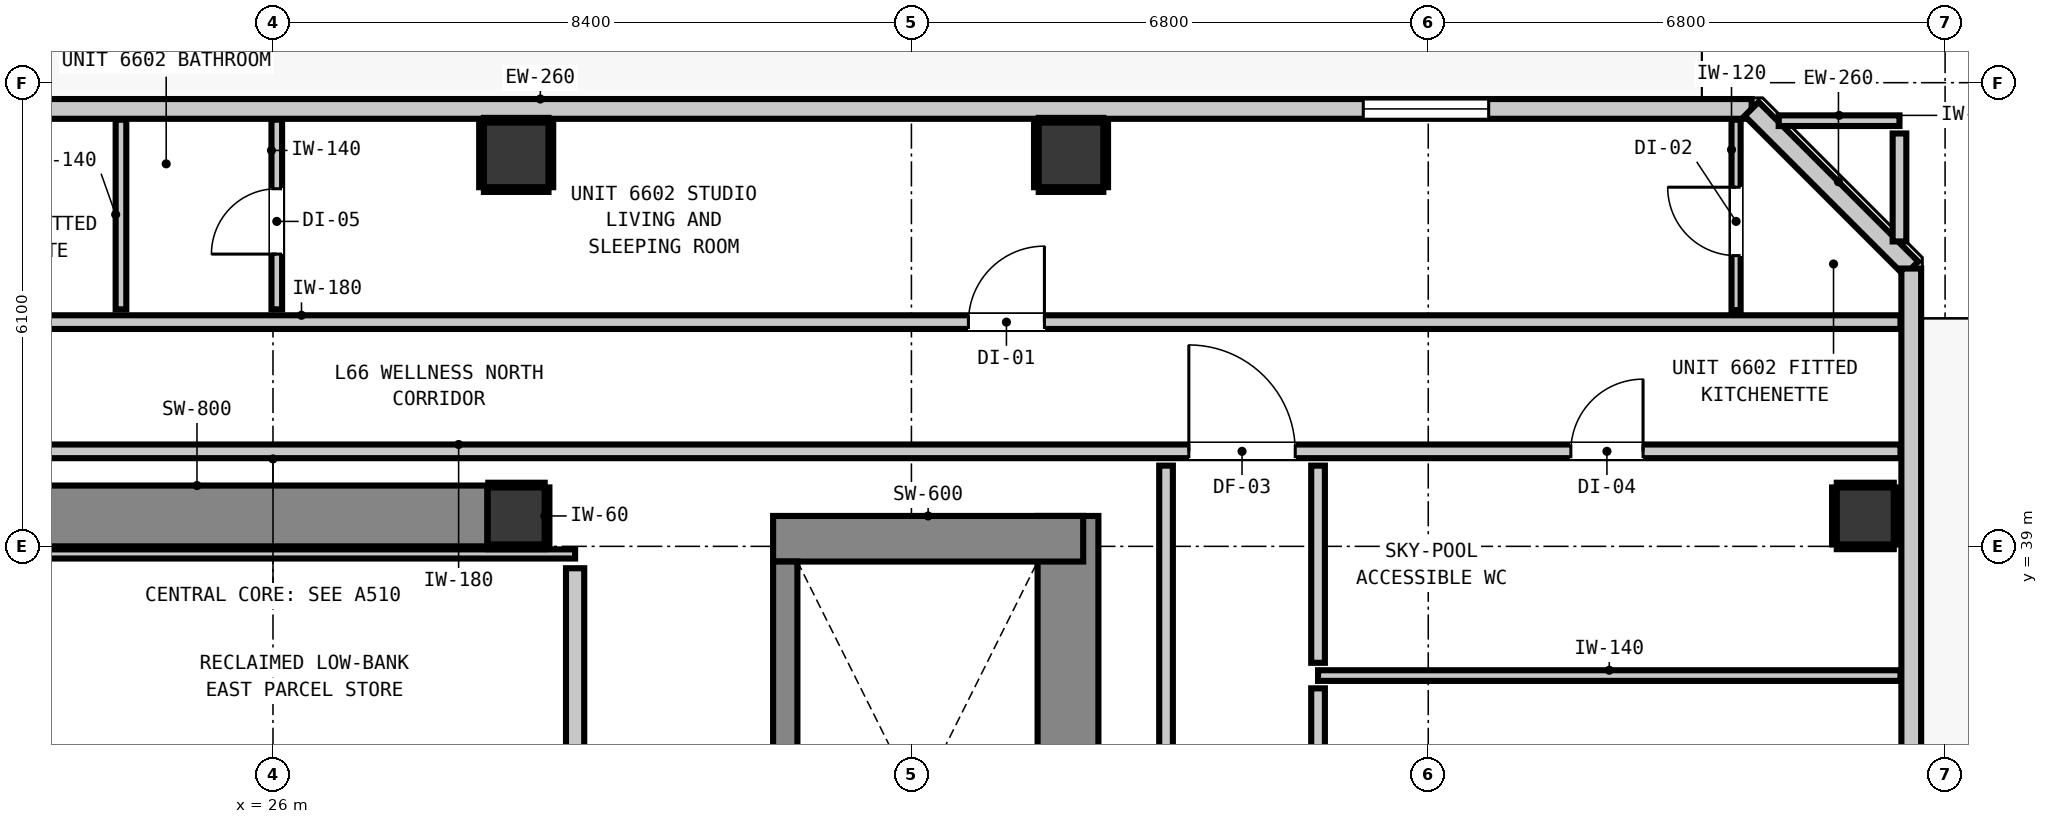
"""IFC4 building model, lengths in metres.
Left out: names, types, materials, properties, quantities, classifications, styles, units other than length and angle.
Written with IfcOpenShell. Run it as: python <this file> out.ifc"""

import sys

from ifc_helpers import new_model, si_unit, direction, frame, frame_2d, origin, origin_2d, place, context, subcontext, project, spatial, rectangle, extrude, element, fill, save


model = new_model("IFC4")
c1 = context("Model", 3, precision=1e-05, world=origin(), true_north=direction((0.0, 1.0)))
c2 = subcontext(c1, "Body", "Model", "MODEL_VIEW")
j1 = project(units=[si_unit("LENGTHUNIT", "METRE"), si_unit("PLANEANGLEUNIT", "RADIAN")], contexts=[c1])
p1 = place(None, origin())
s1 = spatial("IfcSite", under=j1, at=p1, CompositionType="ELEMENT")
p2 = place(p1, origin())
s2 = spatial("IfcBuilding", under=s1, at=p2, CompositionType="ELEMENT")
p3 = place(p2, frame((0.0, 0.0, 226.68)))
s3 = spatial("IfcBuildingStorey", under=s2, at=p3, CompositionType="ELEMENT", Elevation=226.68)
p4 = place(p3, frame((29.2, 39.4, 0.0), z_axis=(0.0, 0.0, 1.0), x_axis=(1.0, 0.0, 0.0)))
e1 = element("IfcColumn", 1, at=p4, inside=s3, PredefinedType="COLUMN", context=c2, shape_type="SweptSolid", body=[
    extrude(rectangle(XDim=0.75, YDim=0.75, at=origin_2d()), origin(), (0.0, 0.0, 1.0), 4.6),
])
p5 = place(p3, frame((36.46, 31.08, 0.0), z_axis=(0.0, 0.0, 1.0), x_axis=(0.0, 1.0, 0.0)))
e2 = element("IfcWall", 2, at=p5, inside=s3, PredefinedType="SHEAR", context=c2, shape_type="SweptSolid", body=[
    extrude(rectangle(XDim=8.32, YDim=0.8, at=frame_2d((4.16, 0.0))), origin(), (0.0, 0.0, 1.0), 4.6),
])
p6 = place(p3, frame((32.58, 39.1, 0.0), z_axis=(0.0, 0.0, 1.0), x_axis=(1.0, 0.0, 0.0)))
e3 = element("IfcWall", 3, at=p6, inside=s3, PredefinedType="SHEAR", context=c2, shape_type="SweptSolid", body=[
    extrude(rectangle(XDim=4.08, YDim=0.6, at=frame_2d((2.04, 0.0))), origin(), (0.0, 0.0, 1.0), 4.6),
])
p7 = place(p3, frame((21.18, 39.4, 0.0), z_axis=(0.0, 0.0, 1.0), x_axis=(1.0, 0.0, 0.0)))
e4 = element("IfcWall", 4, at=p7, inside=s3, PredefinedType="SHEAR", context=c2, shape_type="SweptSolid", body=[
    extrude(rectangle(XDim=7.64, YDim=0.8, at=frame_2d((3.82, 0.0))), origin(), (0.0, 0.0, 1.0), 4.6),
])
p8 = place(p3, frame((32.74, 31.0, 0.0), z_axis=(0.0, 0.0, 1.0), x_axis=(0.0, 1.0, 0.0)))
e5 = element("IfcWall", 5, at=p8, inside=s3, PredefinedType="SHEAR", context=c2, shape_type="SweptSolid", body=[
    extrude(rectangle(XDim=7.8, YDim=0.32, at=frame_2d((3.9, 0.0))), origin(), (0.0, 0.0, 1.0), 4.6),
])
p9 = place(p8, frame((0.19, 0.0, 0.0)))
e6 = element("IfcOpeningElement", 6, at=p9, cuts=e5, PredefinedType="OPENING", context=c2, shape_type="SweptSolid", body=[
    extrude(rectangle(XDim=1.1, YDim=2.15, at=frame_2d((0.55, 1.075))), frame((0.0, 0.17, 0.0), z_axis=(0.0, -1.0, 0.0), x_axis=(1.0, 0.0, 0.0)), (0.0, 0.0, 1.0), 0.34),
])
for number, where, z_axis, x_axis in (
    (7, (29.2, 44.15, 0.0), (0.0, 0.0, 1.0), (1.0, 0.0, 0.0)),
    (8, (36.5, 44.15, 0.0), (0.0, 0.0, 1.0), (1.0, 0.0, 0.0)),
):
    element("IfcColumn", number, at=place(p3, frame(where, z_axis=z_axis, x_axis=x_axis)), inside=s3, PredefinedType="COLUMN", context=c2, shape_type="SweptSolid", body=[
        extrude(rectangle(XDim=0.85, YDim=0.85, at=origin_2d()), origin(), (0.0, 0.0, 1.0), 4.18),
    ])
p10 = place(p3, frame((46.95, 39.4, 0.0), z_axis=(0.0, 0.0, 1.0), x_axis=(1.0, 0.0, 0.0)))
e9 = element("IfcColumn", 9, at=p10, inside=s3, PredefinedType="COLUMN", context=c2, shape_type="SweptSolid", body=[
    extrude(rectangle(XDim=0.75, YDim=0.75, at=origin_2d()), origin(), (0.0, 0.0, 1.0), 4.18),
])
p11 = place(p3, frame((12.745, 44.755, 0.0), z_axis=(0.0, 0.0, 1.0), x_axis=(1.0, 0.0, 0.0)))
e10 = element("IfcWall", 10, at=p11, inside=s3, PredefinedType="STANDARD", context=c2, shape_type="SweptSolid", body=[
    extrude(rectangle(XDim=32.71, YDim=0.26, at=frame_2d((16.355, 0.0))), origin(), (0.0, 0.0, 1.0), 4.18),
])
p12 = place(p11, frame((2.665, 0.0, 0.0)))
e11 = element("IfcOpeningElement", 11, at=p12, cuts=e10, PredefinedType="OPENING", context=c2, shape_type="SweptSolid", body=[
    extrude(rectangle(XDim=1.0, YDim=2.15, at=frame_2d((0.5, 1.075))), frame((0.0, 0.14, 0.0), z_axis=(0.0, -1.0, 0.0), x_axis=(1.0, 0.0, 0.0)), (0.0, 0.0, 1.0), 0.28),
])
p13 = place(p11, frame((4.295, 0.0, 0.85)))
e12 = element("IfcOpeningElement", 12, at=p13, cuts=e10, PredefinedType="OPENING", context=c2, shape_type="SweptSolid", body=[
    extrude(rectangle(XDim=1.65, YDim=1.75, at=frame_2d((0.825, 0.875))), frame((0.0, 0.14, 0.0), z_axis=(0.0, -1.0, 0.0), x_axis=(1.0, 0.0, 0.0)), (0.0, 0.0, 1.0), 0.28),
])
p14 = place(p11, frame((27.6, 0.0, 0.85)))
e13 = element("IfcOpeningElement", 13, at=p14, cuts=e10, PredefinedType="OPENING", context=c2, shape_type="SweptSolid", body=[
    extrude(rectangle(XDim=1.65, YDim=1.75, at=frame_2d((0.825, 0.875))), frame((0.0, 0.14, 0.0), z_axis=(0.0, -1.0, 0.0), x_axis=(1.0, 0.0, 0.0)), (0.0, 0.0, 1.0), 0.28),
])
p15 = place(p3, frame((45.455, 44.755, 0.0), z_axis=(0.0, 0.0, 1.0), x_axis=(0.707106781187, -0.707106781187, 0.0)))
e14 = element("IfcWall", 14, at=p15, inside=s3, PredefinedType="STANDARD", context=c2, shape_type="SweptSolid", body=[
    extrude(rectangle(XDim=2.97, YDim=0.26, at=frame_2d((1.485, 0.0))), origin(), (0.0, 0.0, 1.0), 4.18),
])
p16 = place(p3, frame((47.555, 42.655, 0.0), z_axis=(0.0, 0.0, 1.0), x_axis=(0.0, -1.0, 0.0)))
e15 = element("IfcWall", 15, at=p16, inside=s3, PredefinedType="STANDARD", context=c2, shape_type="SweptSolid", body=[
    extrude(rectangle(XDim=30.31, YDim=0.26, at=frame_2d((15.155, 0.0))), origin(), (0.0, 0.0, 1.0), 4.18),
])
p17 = place(p16, frame((23.818, 0.0, 0.0)))
e16 = element("IfcOpeningElement", 16, at=p17, cuts=e15, PredefinedType="OPENING", context=c2, shape_type="SweptSolid", body=[
    extrude(rectangle(XDim=1.0, YDim=2.15, at=frame_2d((0.5, 1.075))), frame((0.0, 0.14, 0.0), z_axis=(0.0, -1.0, 0.0), x_axis=(1.0, 0.0, 0.0)), (0.0, 0.0, 1.0), 0.28),
])
p18 = place(p3, frame((10.787, 40.25, 0.0), z_axis=(0.0, 0.0, 1.0), x_axis=(1.0, 0.0, 0.0)))
e17 = element("IfcWall", 17, at=p18, inside=s3, PredefinedType="PARTITIONING", context=c2, shape_type="SweptSolid", body=[
    extrude(rectangle(XDim=36.626, YDim=0.18, at=frame_2d((18.313, 0.0))), origin(), (0.0, 0.0, 1.0), 4.18),
])
p19 = place(p18, frame((6.648, 0.0, 0.0)))
e18 = element("IfcOpeningElement", 18, at=p19, cuts=e17, PredefinedType="OPENING", context=c2, shape_type="SweptSolid", body=[
    extrude(rectangle(XDim=1.4, YDim=2.15, at=frame_2d((0.7, 1.075))), frame((0.0, 0.1, 0.0), z_axis=(0.0, -1.0, 0.0), x_axis=(1.0, 0.0, 0.0)), (0.0, 0.0, 1.0), 0.2),
])
p20 = place(p18, frame((1.012, 0.0, 0.0)))
e19 = element("IfcOpeningElement", 19, at=p20, cuts=e17, PredefinedType="OPENING", context=c2, shape_type="SweptSolid", body=[
    extrude(rectangle(XDim=1.0, YDim=2.15, at=frame_2d((0.5, 1.075))), frame((0.0, 0.1, 0.0), z_axis=(0.0, -1.0, 0.0), x_axis=(1.0, 0.0, 0.0)), (0.0, 0.0, 1.0), 0.2),
])
p21 = place(p18, frame((27.263, 0.0, 0.0)))
e20 = element("IfcOpeningElement", 20, at=p21, cuts=e17, PredefinedType="OPENING", context=c2, shape_type="SweptSolid", body=[
    extrude(rectangle(XDim=1.4, YDim=2.15, at=frame_2d((0.7, 1.075))), frame((0.0, 0.1, 0.0), z_axis=(0.0, -1.0, 0.0), x_axis=(1.0, 0.0, 0.0)), (0.0, 0.0, 1.0), 0.2),
])
p22 = place(p18, frame((32.289, 0.0, 0.0)))
e21 = element("IfcOpeningElement", 21, at=p22, cuts=e17, PredefinedType="OPENING", context=c2, shape_type="SweptSolid", body=[
    extrude(rectangle(XDim=0.95, YDim=2.1, at=frame_2d((0.475, 1.05))), frame((0.0, 0.1, 0.0), z_axis=(0.0, -1.0, 0.0), x_axis=(1.0, 0.0, 0.0)), (0.0, 0.0, 1.0), 0.2),
])
p23 = place(p3, frame((10.787, 41.95, 0.0), z_axis=(0.0, 0.0, 1.0), x_axis=(1.0, 0.0, 0.0)))
e22 = element("IfcWall", 22, at=p23, inside=s3, PredefinedType="PARTITIONING", context=c2, shape_type="SweptSolid", body=[
    extrude(rectangle(XDim=36.626, YDim=0.18, at=frame_2d((18.313, 0.0))), origin(), (0.0, 0.0, 1.0), 4.18),
])
p24 = place(p23, frame((5.813, 0.0, 0.0)))
e23 = element("IfcOpeningElement", 23, at=p24, cuts=e22, PredefinedType="OPENING", context=c2, shape_type="SweptSolid", body=[
    extrude(rectangle(XDim=1.0, YDim=2.15, at=frame_2d((0.5, 1.075))), frame((0.0, 0.1, 0.0), z_axis=(0.0, -1.0, 0.0), x_axis=(1.0, 0.0, 0.0)), (0.0, 0.0, 1.0), 0.2),
])
p25 = place(p23, frame((24.363, 0.0, 0.0)))
e24 = element("IfcOpeningElement", 24, at=p25, cuts=e22, PredefinedType="OPENING", context=c2, shape_type="SweptSolid", body=[
    extrude(rectangle(XDim=1.0, YDim=2.15, at=frame_2d((0.5, 1.075))), frame((0.0, 0.1, 0.0), z_axis=(0.0, -1.0, 0.0), x_axis=(1.0, 0.0, 0.0)), (0.0, 0.0, 1.0), 0.2),
])
p26 = place(p3, frame((39.75, 37.3, 0.0), z_axis=(0.0, 0.0, 1.0), x_axis=(1.0, 0.0, 0.0)))
e25 = element("IfcWall", 25, at=p26, inside=s3, PredefinedType="PARTITIONING", context=c2, shape_type="SweptSolid", body=[
    extrude(rectangle(XDim=7.663, YDim=0.14, at=frame_2d((3.832, 0.0))), origin(), (0.0, 0.0, 1.0), 4.18),
])
p27 = place(p3, frame((45.811, 44.6, 0.0), z_axis=(0.0, 0.0, 1.0), x_axis=(1.0, 0.0, 0.0)))
e26 = element("IfcWall", 26, at=p27, inside=s3, PredefinedType="PARTITIONING", context=c2, shape_type="SweptSolid", body=[
    extrude(rectangle(XDim=1.589, YDim=0.14, at=frame_2d((0.794, 0.0))), origin(), (0.0, 0.0, 1.0), 4.18),
])
p28 = place(p3, frame((18.95, 38.9, 0.0), z_axis=(0.0, 0.0, 1.0), x_axis=(1.0, 0.0, 0.0)))
e27 = element("IfcWall", 27, at=p28, inside=s3, PredefinedType="PARTITIONING", context=c2, shape_type="SweptSolid", body=[
    extrude(rectangle(XDim=11.025, YDim=0.12, at=frame_2d((5.513, 0.0))), origin(), (0.0, 0.0, 1.0), 2.185),
])
p29 = place(p3, frame((29.975, 36.268, 0.0), z_axis=(0.0, 0.0, 1.0), x_axis=(0.0, 1.0, 0.0)))
e28 = element("IfcWall", 28, at=p29, inside=s3, PredefinedType="PARTITIONING", context=c2, shape_type="SweptSolid", body=[
    extrude(rectangle(XDim=2.444, YDim=0.24, at=frame_2d((1.222, 0.0))), origin(), (0.0, 0.0, 1.0), 4.18),
])
p30 = place(p3, frame((37.75, 21.368, 0.0), z_axis=(0.0, 0.0, 1.0), x_axis=(0.0, 1.0, 0.0)))
e29 = element("IfcWall", 29, at=p30, inside=s3, PredefinedType="PARTITIONING", context=c2, shape_type="SweptSolid", body=[
    extrude(rectangle(XDim=18.694, YDim=0.18, at=frame_2d((9.347, 0.0))), origin(), (0.0, 0.0, 1.0), 4.18),
])
p31 = place(p3, frame((39.75, 28.618, 0.0), z_axis=(0.0, 0.0, 1.0), x_axis=(0.0, 1.0, 0.0)))
e30 = element("IfcWall", 30, at=p31, inside=s3, PredefinedType="PARTITIONING", context=c2, shape_type="SweptSolid", body=[
    extrude(rectangle(XDim=8.514, YDim=0.18, at=frame_2d((4.257, 0.0))), origin(), (0.0, 0.0, 1.0), 4.18),
])
p32 = place(p31, frame((3.782, 0.0, 0.0)))
e31 = element("IfcOpeningElement", 31, at=p32, cuts=e30, PredefinedType="OPENING", context=c2, shape_type="SweptSolid", body=[
    extrude(rectangle(XDim=0.9, YDim=2.1, at=frame_2d((0.45, 1.05))), frame((0.0, 0.1, 0.0), z_axis=(0.0, -1.0, 0.0), x_axis=(1.0, 0.0, 0.0)), (0.0, 0.0, 1.0), 0.2),
])
p33 = place(p3, frame((39.75, 37.468, 0.0), z_axis=(0.0, 0.0, 1.0), x_axis=(0.0, 1.0, 0.0)))
e32 = element("IfcWall", 32, at=p33, inside=s3, PredefinedType="PARTITIONING", context=c2, shape_type="SweptSolid", body=[
    extrude(rectangle(XDim=2.594, YDim=0.18, at=frame_2d((1.297, 0.0))), origin(), (0.0, 0.0, 1.0), 4.18),
])
p34 = place(p3, frame((47.4, 43.011, 0.0), z_axis=(0.0, 0.0, 1.0), x_axis=(0.0, 1.0, 0.0)))
e33 = element("IfcWall", 33, at=p34, inside=s3, PredefinedType="PARTITIONING", context=c2, shape_type="SweptSolid", body=[
    extrude(rectangle(XDim=1.421, YDim=0.18, at=frame_2d((0.71, 0.0))), origin(), (0.0, 0.0, 1.0), 4.18),
])
p35 = place(p3, frame((24.0, 42.118, 0.0), z_axis=(0.0, 0.0, 1.0), x_axis=(0.0, 1.0, 0.0)))
e34 = element("IfcWall", 34, at=p35, inside=s3, PredefinedType="PARTITIONING", context=c2, shape_type="SweptSolid", body=[
    extrude(rectangle(XDim=2.495, YDim=0.14, at=frame_2d((1.248, 0.0))), origin(), (0.0, 0.0, 1.0), 4.18),
])
p36 = place(p3, frame((26.05, 42.118, 0.0), z_axis=(0.0, 0.0, 1.0), x_axis=(0.0, 1.0, 0.0)))
e35 = element("IfcWall", 35, at=p36, inside=s3, PredefinedType="PARTITIONING", context=c2, shape_type="SweptSolid", body=[
    extrude(rectangle(XDim=2.495, YDim=0.14, at=frame_2d((1.248, 0.0))), origin(), (0.0, 0.0, 1.0), 4.18),
])
p37 = place(p36, frame((0.727, 0.0, 0.0)))
e36 = element("IfcOpeningElement", 36, at=p37, cuts=e35, PredefinedType="OPENING", context=c2, shape_type="SweptSolid", body=[
    extrude(rectangle(XDim=0.86, YDim=2.02, at=frame_2d((0.43, 1.01))), frame((0.0, 0.08, 0.0), z_axis=(0.0, -1.0, 0.0), x_axis=(1.0, 0.0, 0.0)), (0.0, 0.0, 1.0), 0.16),
])
p38 = place(p3, frame((45.25, 42.108, 0.0), z_axis=(0.0, 0.0, 1.0), x_axis=(0.0, 1.0, 0.0)))
e37 = element("IfcWall", 37, at=p38, inside=s3, PredefinedType="PARTITIONING", context=c2, shape_type="SweptSolid", body=[
    extrude(rectangle(XDim=2.505, YDim=0.12, at=frame_2d((1.252, 0.0))), origin(), (0.0, 0.0, 1.0), 4.18),
])
p39 = place(p38, frame((0.717, 0.0, 0.0)))
e38 = element("IfcOpeningElement", 38, at=p39, cuts=e37, PredefinedType="OPENING", context=c2, shape_type="SweptSolid", body=[
    extrude(rectangle(XDim=0.9, YDim=2.1, at=frame_2d((0.45, 1.05))), frame((0.0, 0.07, 0.0), z_axis=(0.0, -1.0, 0.0), x_axis=(1.0, 0.0, 0.0)), (0.0, 0.0, 1.0), 0.14),
])
for number, where, z_axis, x_axis in (
    (39, (28.833, 38.993, 0.0), (0.0, 0.0, 1.0), (1.0, 0.0, 0.0)),
    (40, (28.833, 39.807, 0.0), (0.0, 0.0, 1.0), (1.0, 0.0, 0.0)),
):
    element("IfcWall", number, at=place(p3, frame(where, z_axis=z_axis, x_axis=x_axis)), inside=s3, PredefinedType="PARTITIONING", context=c2, shape_type="SweptSolid", body=[
        extrude(rectangle(XDim=0.742, YDim=0.06, at=frame_2d((0.371, 0.0))), origin(), (0.0, 0.0, 1.0), 1.45),
    ])
p40 = place(p3, frame((29.607, 39.025, 0.0), z_axis=(0.0, 0.0, 1.0), x_axis=(0.0, 1.0, 0.0)))
e41 = element("IfcWall", 41, at=p40, inside=s3, PredefinedType="PARTITIONING", context=c2, shape_type="SweptSolid", body=[
    extrude(rectangle(XDim=0.75, YDim=0.06, at=frame_2d((0.375, 0.0))), origin(), (0.0, 0.0, 1.0), 1.45),
])
for number, where, z_axis, x_axis in (
    (42, (28.775, 43.693, 0.0), (0.0, 0.0, 1.0), (1.0, 0.0, 0.0)),
    (43, (28.775, 44.607, 0.0), (0.0, 0.0, 1.0), (1.0, 0.0, 0.0)),
):
    element("IfcWall", number, at=place(p3, frame(where, z_axis=z_axis, x_axis=x_axis)), inside=s3, PredefinedType="PARTITIONING", context=c2, shape_type="SweptSolid", body=[
        extrude(rectangle(XDim=0.85, YDim=0.06, at=frame_2d((0.425, 0.0))), origin(), (0.0, 0.0, 1.0), 1.45),
    ])
for number, where, z_axis, x_axis in (
    (44, (28.743, 43.725, 0.0), (0.0, 0.0, 1.0), (0.0, 1.0, 0.0)),
    (45, (29.657, 43.725, 0.0), (0.0, 0.0, 1.0), (0.0, 1.0, 0.0)),
):
    element("IfcWall", number, at=place(p3, frame(where, z_axis=z_axis, x_axis=x_axis)), inside=s3, PredefinedType="PARTITIONING", context=c2, shape_type="SweptSolid", body=[
        extrude(rectangle(XDim=0.85, YDim=0.06, at=frame_2d((0.425, 0.0))), origin(), (0.0, 0.0, 1.0), 1.45),
    ])
for number, where, z_axis, x_axis in (
    (46, (36.075, 43.693, 0.0), (0.0, 0.0, 1.0), (1.0, 0.0, 0.0)),
    (47, (36.075, 44.607, 0.0), (0.0, 0.0, 1.0), (1.0, 0.0, 0.0)),
):
    element("IfcWall", number, at=place(p3, frame(where, z_axis=z_axis, x_axis=x_axis)), inside=s3, PredefinedType="PARTITIONING", context=c2, shape_type="SweptSolid", body=[
        extrude(rectangle(XDim=0.85, YDim=0.06, at=frame_2d((0.425, 0.0))), origin(), (0.0, 0.0, 1.0), 1.45),
    ])
for number, where, z_axis, x_axis in (
    (48, (36.043, 43.725, 0.0), (0.0, 0.0, 1.0), (0.0, 1.0, 0.0)),
    (49, (36.957, 43.725, 0.0), (0.0, 0.0, 1.0), (0.0, 1.0, 0.0)),
):
    element("IfcWall", number, at=place(p3, frame(where, z_axis=z_axis, x_axis=x_axis)), inside=s3, PredefinedType="PARTITIONING", context=c2, shape_type="SweptSolid", body=[
        extrude(rectangle(XDim=0.85, YDim=0.06, at=frame_2d((0.425, 0.0))), origin(), (0.0, 0.0, 1.0), 1.45),
    ])
for number, where, z_axis, x_axis in (
    (50, (46.575, 38.993, 0.0), (0.0, 0.0, 1.0), (1.0, 0.0, 0.0)),
    (51, (46.575, 39.807, 0.0), (0.0, 0.0, 1.0), (1.0, 0.0, 0.0)),
    (52, (46.543, 39.025, 0.0), (0.0, 0.0, 1.0), (0.0, 1.0, 0.0)),
    (53, (47.357, 39.025, 0.0), (0.0, 0.0, 1.0), (0.0, 1.0, 0.0)),
):
    element("IfcWall", number, at=place(p3, frame(where, z_axis=z_axis, x_axis=x_axis)), inside=s3, PredefinedType="PARTITIONING", context=c2, shape_type="SweptSolid", body=[
        extrude(rectangle(XDim=0.75, YDim=0.06, at=frame_2d((0.375, 0.0))), origin(), (0.0, 0.0, 1.0), 1.45),
    ])
p41 = place(p14, origin())
e54 = element("IfcWindow", 54, at=p41, inside=s3, PartitioningType="SINGLE_PANEL", PredefinedType="WINDOW", context=c2, shape_type="SweptSolid", body=[
    extrude(rectangle(XDim=1.65, YDim=1.75, at=frame_2d((0.825, 0.875))), frame((0.0, 0.03, 0.0), z_axis=(0.0, -1.0, 0.0), x_axis=(1.0, 0.0, 0.0)), (0.0, 0.0, 1.0), 0.06),
])
fill(e13, e54)
p42 = place(p21, origin())
e55 = element("IfcDoor", 55, at=p42, inside=s3, OperationType="SINGLE_SWING_LEFT", PredefinedType="DOOR", context=c2, shape_type="SweptSolid", body=[
    extrude(rectangle(XDim=1.4, YDim=2.15, at=frame_2d((0.7, 1.075))), frame((0.0, 0.025, 0.0), z_axis=(0.0, -1.0, 0.0), x_axis=(1.0, 0.0, 0.0)), (0.0, 0.0, 1.0), 0.05),
])
fill(e20, e55)
p43 = place(p22, origin())
e56 = element("IfcDoor", 56, at=p43, inside=s3, OperationType="SINGLE_SWING_RIGHT", PredefinedType="DOOR", context=c2, shape_type="SweptSolid", body=[
    extrude(rectangle(XDim=0.95, YDim=2.1, at=frame_2d((0.475, 1.05))), frame((0.0, 0.025, 0.0), z_axis=(0.0, -1.0, 0.0), x_axis=(1.0, 0.0, 0.0)), (0.0, 0.0, 1.0), 0.05),
])
fill(e21, e56)
p44 = place(p25, origin())
e57 = element("IfcDoor", 57, at=p44, inside=s3, OperationType="SINGLE_SWING_RIGHT", PredefinedType="DOOR", context=c2, shape_type="SweptSolid", body=[
    extrude(rectangle(XDim=1.0, YDim=2.15, at=frame_2d((0.5, 1.075))), frame((0.0, 0.025, 0.0), z_axis=(0.0, -1.0, 0.0), x_axis=(1.0, 0.0, 0.0)), (0.0, 0.0, 1.0), 0.05),
])
fill(e24, e57)
p45 = place(p37, origin())
e58 = element("IfcDoor", 58, at=p45, inside=s3, OperationType="SINGLE_SWING_LEFT", PredefinedType="DOOR", context=c2, shape_type="SweptSolid", body=[
    extrude(rectangle(XDim=0.86, YDim=2.02, at=frame_2d((0.43, 1.01))), frame((0.0, 0.025, 0.0), z_axis=(0.0, -1.0, 0.0), x_axis=(1.0, 0.0, 0.0)), (0.0, 0.0, 1.0), 0.05),
])
fill(e36, e58)
p46 = place(p39, origin())
e59 = element("IfcDoor", 59, at=p46, inside=s3, OperationType="SINGLE_SWING_RIGHT", PredefinedType="DOOR", context=c2, shape_type="SweptSolid", body=[
    extrude(rectangle(XDim=0.9, YDim=2.1, at=frame_2d((0.45, 1.05))), frame((0.0, 0.025, 0.0), z_axis=(0.0, -1.0, 0.0), x_axis=(1.0, 0.0, 0.0)), (0.0, 0.0, 1.0), 0.05),
])
fill(e38, e59)
save(model, sys.argv[1])
